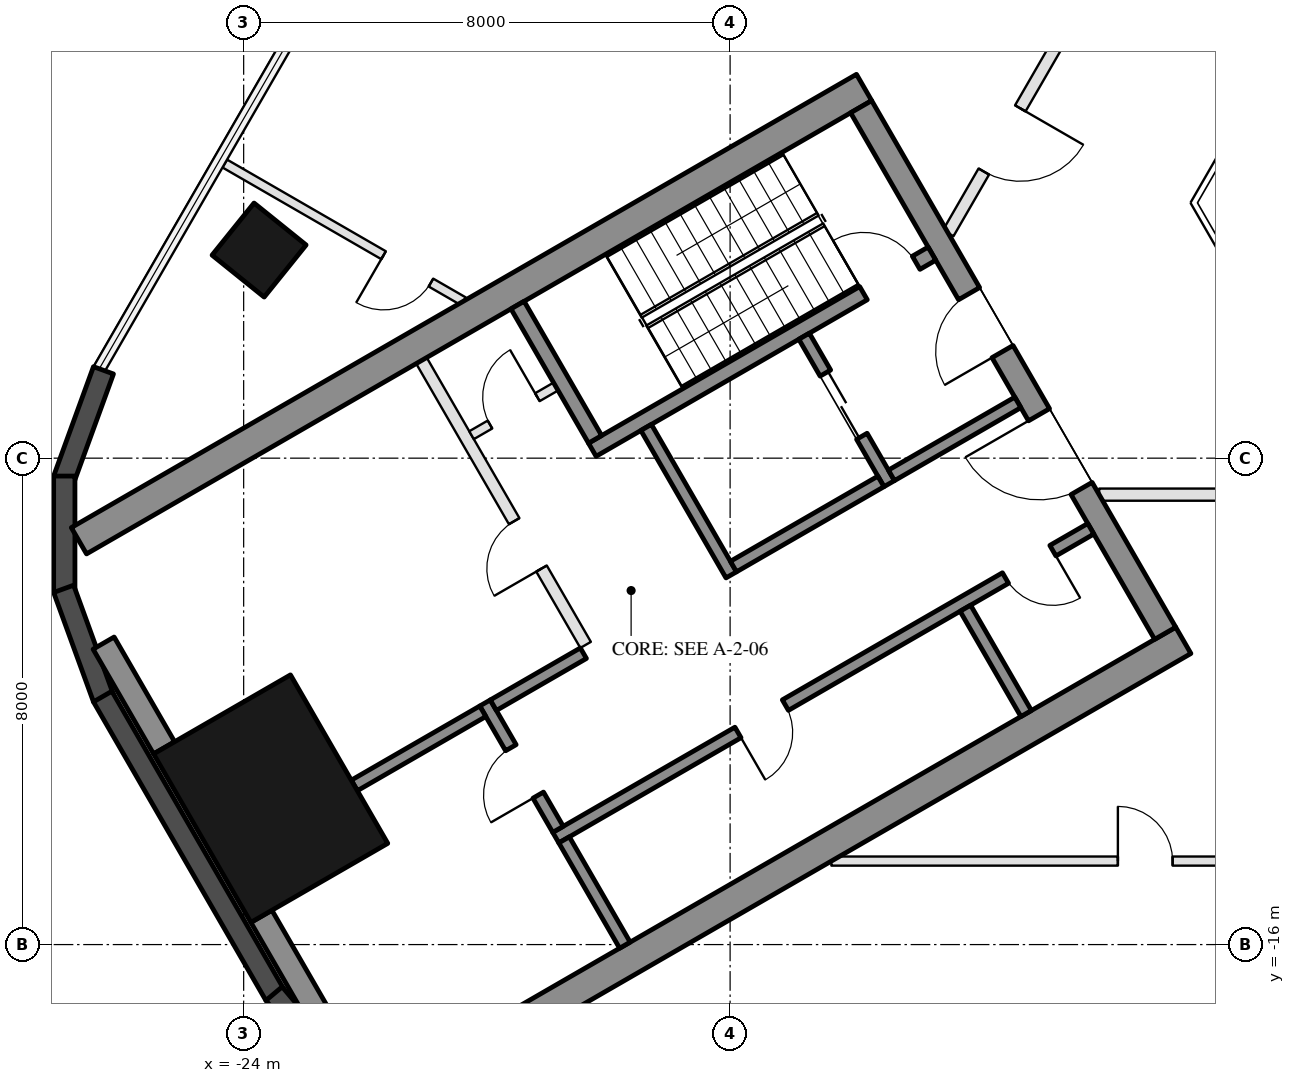
"""IFC4 building model, lengths in metres.
Left out: names, types, materials, properties, quantities, classifications, styles, units other than length and angle.
Written with IfcOpenShell. Run it as: python <this file> out.ifc"""

import sys

from ifc_helpers import new_model, si_unit, direction, frame, frame_2d, origin, origin_2d, place, context, subcontext, project, spatial, rectangle, hollow_rectangle, extrude, boolean, halfspace, element, fill, save


model = new_model("IFC4")
c1 = context("Model", 3, precision=1e-05, world=origin(), true_north=direction((0.0, 1.0)))
c2 = subcontext(c1, "Body", "Model", "MODEL_VIEW")
j1 = project(units=[si_unit("LENGTHUNIT", "METRE"), si_unit("PLANEANGLEUNIT", "RADIAN")], contexts=[c1])
p1 = place(None, origin())
s1 = spatial("IfcSite", under=j1, at=p1, CompositionType="ELEMENT")
p2 = place(p1, origin())
s2 = spatial("IfcBuilding", under=s1, at=p2, CompositionType="ELEMENT")
p3 = place(p2, frame((0.0, 0.0, 33.0)))
s3 = spatial("IfcBuildingStorey", under=s2, at=p3, CompositionType="ELEMENT", Elevation=33.0)
p4 = place(p3, frame((-23.746, -4.577, 0.0), z_axis=(0.01301970202, 0.00206145282, 0.999913115111), x_axis=(-0.497599356322, -0.867367587298, 0.008267351011)))
e1 = element("IfcColumn", 1, at=p4, inside=s3, PredefinedType="COLUMN", context=c2, shape_type="SweptSolid", body=[
    boolean("DIFFERENCE", boolean("DIFFERENCE", extrude(hollow_rectangle(XDim=1.1, YDim=1.1, WallThickness=0.05, at=origin_2d()), origin(), (0.0, 0.0, 1.0), 4.5), halfspace(frame((0.0, 0.0, 0.012), z_axis=(0.0, 0.0, 1.0), x_axis=(1.0, 0.0, 0.0)), True)), halfspace(frame((0.0, 0.0, 4.493), z_axis=(0.0, 0.0, 1.0), x_axis=(1.0, 0.0, 0.0)), False)),
])
p5 = place(p3, frame((-23.556, -13.6, 0.0), z_axis=(0.0, 0.0, 1.0), x_axis=(-0.5, 0.866025403784, 0.0)))
e2 = element("IfcColumn", 2, at=p5, inside=s3, PredefinedType="COLUMN", context=c2, shape_type="SweptSolid", body=[
    extrude(hollow_rectangle(XDim=3.2, YDim=2.6, WallThickness=0.08, at=origin_2d()), origin(), (0.0, 0.0, 1.0), 4.5),
])
for number, where, z_axis, x_axis in (
    (3, (-26.305, -6.555, 0.0), (0.0, 0.0, 1.0), (-0.342, -0.94, 0.0)),
    (4, (-26.95, -8.294, 0.0), (0.0, 0.0, 1.0), (0.0, -1.0, 0.0)),
    (5, (-26.96, -10.149, 0.0), (0.0, 0.0, 1.0), (0.342, -0.94, 0.0)),
):
    element("IfcWall", number, at=place(p3, frame(where, z_axis=z_axis, x_axis=x_axis)), inside=s3, PredefinedType="SOLIDWALL", context=c2, shape_type="SweptSolid", body=[
        extrude(rectangle(XDim=1.915, YDim=0.35, at=frame_2d((0.957, 0.0))), origin(), (0.0, 0.0, 1.0), 4.2),
    ])
p6 = place(p3, frame((-26.318, -11.921, 0.0), z_axis=(0.0, 0.0, 1.0), x_axis=(0.499982068559, -0.866035756259, 0.0)))
e6 = element("IfcWall", 6, at=p6, inside=s3, PredefinedType="SOLIDWALL", context=c2, shape_type="SweptSolid", body=[
    extrude(rectangle(XDim=5.671, YDim=0.35, at=frame_2d((2.835, 0.0))), origin(), (0.0, 0.0, 1.0), 4.2),
])
p7 = place(p3, frame((-23.5, -16.807, 0.0), z_axis=(0.0, 0.0, 1.0), x_axis=(0.64282715853, -0.766011255959, 0.0)))
e7 = element("IfcWall", 7, at=p7, inside=s3, PredefinedType="SOLIDWALL", context=c2, shape_type="SweptSolid", body=[
    extrude(rectangle(XDim=1.915, YDim=0.35, at=frame_2d((0.957, 0.0))), origin(), (0.0, 0.0, 1.0), 4.2),
])
for number, where, z_axis, x_axis in (
    (8, (-13.797, -1.903, 0.0), (0.0, 0.0, 1.0), (-0.866, -0.5, 0.0)),
    (9, (-8.547, -10.997, 0.0), (0.0, 0.0, 1.0), (-0.866, -0.5, 0.0)),
):
    element("IfcWall", number, at=place(p3, frame(where, z_axis=z_axis, x_axis=x_axis)), inside=s3, PredefinedType="SHEAR", context=c2, shape_type="SweptSolid", body=[
        extrude(rectangle(XDim=14.91, YDim=0.5, at=frame_2d((7.455, 0.0))), origin(), (0.0, 0.0, 1.0), 4.2),
    ])
p8 = place(p3, frame((-13.845, -2.22, 0.0), z_axis=(0.0, 0.0, 1.0), x_axis=(0.500004234368, -0.866022959057, 0.0)))
e10 = element("IfcWall", 10, at=p8, inside=s3, PredefinedType="SHEAR", context=c2, shape_type="SweptSolid", body=[
    extrude(rectangle(XDim=10.0, YDim=0.4, at=frame_2d((5.0, 0.0))), origin(), (0.0, 0.0, 1.0), 4.2),
])
p9 = place(p8, frame((3.55, 0.0, 0.0)))
e11 = element("IfcOpeningElement", 11, at=p9, cuts=e10, PredefinedType="OPENING", context=c2, shape_type="SweptSolid", body=[
    extrude(rectangle(XDim=1.1, YDim=2.1, at=frame_2d((0.55, 1.05))), frame((0.0, 0.21, 0.0), z_axis=(0.0, -1.0, 0.0), x_axis=(1.0, 0.0, 0.0)), (0.0, 0.0, 1.0), 0.42),
])
p10 = place(p8, frame((5.85, 0.0, 0.0)))
e12 = element("IfcOpeningElement", 12, at=p10, cuts=e10, PredefinedType="OPENING", context=c2, shape_type="SweptSolid", body=[
    extrude(rectangle(XDim=1.4, YDim=2.1, at=frame_2d((0.7, 1.05))), frame((0.0, 0.21, 0.0), z_axis=(0.0, -1.0, 0.0), x_axis=(1.0, 0.0, 0.0)), (0.0, 0.0, 1.0), 0.42),
])
for number, where, z_axis, x_axis in (
    (13, (-23.708, -15.536, 0.0), (0.0, 0.0, 1.0), (0.5, -0.866, 0.0)),
    (14, (-26.303, -11.042, 0.0), (0.0, 0.0, 1.0), (0.5, -0.866, 0.0)),
):
    element("IfcWall", number, at=place(p3, frame(where, z_axis=z_axis, x_axis=x_axis)), inside=s3, PredefinedType="SHEAR", context=c2, shape_type="SweptSolid", body=[
        extrude(rectangle(XDim=1.989, YDim=0.4, at=frame_2d((0.995, 0.0))), origin(), (0.0, 0.0, 1.0), 4.2),
    ])
p11 = place(p3, frame((-12.681, -4.636, 0.0), z_axis=(0.0, 0.0, 1.0), x_axis=(-0.866021702275, -0.500006411147, 0.0)))
e15 = element("IfcWall", 15, at=p11, inside=s3, PredefinedType="SHEAR", context=c2, shape_type="SweptSolid", body=[
    extrude(rectangle(XDim=6.45, YDim=0.25, at=frame_2d((3.225, 0.0))), origin(), (0.0, 0.0, 1.0), 4.2),
])
p12 = place(p11, frame((0.3, 0.0, 0.0)))
e16 = element("IfcOpeningElement", 16, at=p12, cuts=e15, PredefinedType="OPENING", context=c2, shape_type="SweptSolid", body=[
    extrude(rectangle(XDim=1.0, YDim=2.1, at=frame_2d((0.5, 1.05))), frame((0.0, 0.135, 0.0), z_axis=(0.0, -1.0, 0.0), x_axis=(1.0, 0.0, 0.0)), (0.0, 0.0, 1.0), 0.27),
])
p13 = place(p3, frame((-19.496, -5.482, 0.0), z_axis=(0.0, 0.0, 1.0), x_axis=(0.499990435942, -0.866030925526, 0.0)))
e17 = element("IfcWall", 17, at=p13, inside=s3, PredefinedType="SHEAR", context=c2, shape_type="SweptSolid", body=[
    extrude(rectangle(XDim=2.55, YDim=0.25, at=frame_2d((1.275, 0.0))), origin(), (0.0, 0.0, 1.0), 4.2),
])
p14 = place(p3, frame((-17.381, -7.495, 0.0), z_axis=(0.0, 0.0, 1.0), x_axis=(0.500011755427, -0.866018616679, 0.0)))
e18 = element("IfcWall", 18, at=p14, inside=s3, PredefinedType="SHEAR", context=c2, shape_type="SweptSolid", body=[
    extrude(rectangle(XDim=2.8, YDim=0.2, at=frame_2d((1.4, 0.0))), origin(), (0.0, 0.0, 1.0), 4.2),
])
p15 = place(p3, frame((-14.783, -5.995, 0.0), z_axis=(0.0, 0.0, 1.0), x_axis=(0.49994636267, -0.866056369097, 0.0)))
e19 = element("IfcWall", 19, at=p15, inside=s3, PredefinedType="SHEAR", context=c2, shape_type="SweptSolid", body=[
    extrude(rectangle(XDim=2.8, YDim=0.2, at=frame_2d((1.4, 0.0))), origin(), (0.0, 0.0, 1.0), 4.2),
])
p16 = place(p15, frame((0.7, 0.0, 0.0)))
e20 = element("IfcOpeningElement", 20, at=p16, cuts=e19, PredefinedType="OPENING", context=c2, shape_type="SweptSolid", body=[
    extrude(rectangle(XDim=1.2, YDim=2.1, at=frame_2d((0.6, 1.05))), frame((0.0, 0.11, 0.0), z_axis=(0.0, -1.0, 0.0), x_axis=(1.0, 0.0, 0.0)), (0.0, 0.0, 1.0), 0.22),
])
p17 = place(p3, frame((-13.52, -8.383, 0.0), z_axis=(0.0, 0.0, 1.0), x_axis=(-0.866034573852, -0.49998411664, 0.0)))
e21 = element("IfcWall", 21, at=p17, inside=s3, PredefinedType="SHEAR", context=c2, shape_type="SweptSolid", body=[
    extrude(rectangle(XDim=2.8, YDim=0.2, at=frame_2d((1.4, 0.0))), origin(), (0.0, 0.0, 1.0), 4.2),
])
p18 = place(p3, frame((-11.268, -7.083, 0.0), z_axis=(0.0, 0.0, 1.0), x_axis=(-0.866050077142, -0.499957262057, 0.0)))
e22 = element("IfcWall", 22, at=p18, inside=s3, PredefinedType="SHEAR", context=c2, shape_type="SweptSolid", body=[
    extrude(rectangle(XDim=2.4, YDim=0.2, at=frame_2d((1.2, 0.0))), origin(), (0.0, 0.0, 1.0), 4.2),
])
p19 = place(p3, frame((-10.068, -9.162, 0.0), z_axis=(0.0, 0.0, 1.0), x_axis=(-0.866032725843, -0.499987317609, 0.0)))
e23 = element("IfcWall", 23, at=p19, inside=s3, PredefinedType="SHEAR", context=c2, shape_type="SweptSolid", body=[
    extrude(rectangle(XDim=10.16, YDim=0.2, at=frame_2d((5.08, 0.0))), origin(), (0.0, 0.0, 1.0), 4.2),
])
p20 = place(p19, frame((0.72, 0.0, 0.0)))
e24 = element("IfcOpeningElement", 24, at=p20, cuts=e23, PredefinedType="OPENING", context=c2, shape_type="SweptSolid", body=[
    extrude(rectangle(XDim=0.9, YDim=2.1, at=frame_2d((0.45, 1.05))), frame((0.0, 0.11, 0.0), z_axis=(0.0, -1.0, 0.0), x_axis=(1.0, 0.0, 0.0)), (0.0, 0.0, 1.0), 0.22),
])
p21 = place(p19, frame((5.8, 0.0, 0.0)))
e25 = element("IfcOpeningElement", 25, at=p21, cuts=e23, PredefinedType="OPENING", context=c2, shape_type="SweptSolid", body=[
    extrude(rectangle(XDim=0.9, YDim=2.1, at=frame_2d((0.45, 1.05))), frame((0.0, 0.11, 0.0), z_axis=(0.0, -1.0, 0.0), x_axis=(1.0, 0.0, 0.0)), (0.0, 0.0, 1.0), 0.22),
])
p22 = place(p3, frame((-20.031, -12.026, 0.0), z_axis=(0.0, 0.0, 1.0), x_axis=(0.500033551112, -0.866006032174, 0.0)))
e26 = element("IfcWall", 26, at=p22, inside=s3, PredefinedType="SHEAR", context=c2, shape_type="SweptSolid", body=[
    extrude(rectangle(XDim=2.4, YDim=0.2, at=frame_2d((1.2, 0.0))), origin(), (0.0, 0.0, 1.0), 4.2),
])
p23 = place(p22, frame((0.85, 0.0, 0.0)))
e27 = element("IfcOpeningElement", 27, at=p23, cuts=e26, PredefinedType="OPENING", context=c2, shape_type="SweptSolid", body=[
    extrude(rectangle(XDim=0.9, YDim=2.1, at=frame_2d((0.45, 1.05))), frame((0.0, 0.11, 0.0), z_axis=(0.0, -1.0, 0.0), x_axis=(1.0, 0.0, 0.0)), (0.0, 0.0, 1.0), 0.22),
])
p24 = place(p3, frame((-18.413, -11.208, 0.0), z_axis=(0.0, 0.0, 1.0), x_axis=(-0.866038183914, -0.499977863513, 0.0)))
e28 = element("IfcWall", 28, at=p24, inside=s3, PredefinedType="SHEAR", context=c2, shape_type="SweptSolid", body=[
    extrude(rectangle(XDim=1.71, YDim=0.2, at=frame_2d((0.855, 0.0))), origin(), (0.0, 0.0, 1.0), 4.2),
])
for number, where, z_axis, x_axis in (
    (29, (-12.131, -10.468, 0.0), (0.0, 0.0, 1.0), (0.5, -0.866, 0.0)),
    (30, (-18.73, -14.278, 0.0), (0.0, 0.0, 1.0), (0.5, -0.866, 0.0)),
):
    element("IfcWall", number, at=place(p3, frame(where, z_axis=z_axis, x_axis=x_axis)), inside=s3, PredefinedType="SHEAR", context=c2, shape_type="SweptSolid", body=[
        extrude(rectangle(XDim=2.0, YDim=0.2, at=frame_2d((1.0, 0.0))), origin(), (0.0, 0.0, 1.0), 4.2),
    ])
p25 = place(p3, frame((-20.067, -12.163, 0.0), z_axis=(0.0, 0.0, 1.0), x_axis=(-0.866048967903, -0.499959183527, 0.0)))
e31 = element("IfcWall", 31, at=p25, inside=s3, PredefinedType="SHEAR", context=c2, shape_type="SweptSolid", body=[
    extrude(rectangle(XDim=2.44, YDim=0.2, at=frame_2d((1.22, 0.0))), origin(), (0.0, 0.0, 1.0), 4.2),
])
p26 = place(p3, frame((-21.076, -6.395, 0.0), z_axis=(0.0, 0.0, 1.0), x_axis=(0.50001468107, -0.866016927499, 0.0)))
e32 = element("IfcWall", 32, at=p26, inside=s3, PredefinedType="PARTITIONING", context=c2, shape_type="SweptSolid", body=[
    extrude(rectangle(XDim=5.4, YDim=0.2, at=frame_2d((2.7, 0.0))), origin(), (0.0, 0.0, 1.0), 4.2),
])
p27 = place(p26, frame((3.05, 0.0, 0.0)))
e33 = element("IfcOpeningElement", 33, at=p27, cuts=e32, PredefinedType="OPENING", context=c2, shape_type="SweptSolid", body=[
    extrude(rectangle(XDim=0.9, YDim=2.1, at=frame_2d((0.45, 1.05))), frame((0.0, 0.11, 0.0), z_axis=(0.0, -1.0, 0.0), x_axis=(1.0, 0.0, 0.0)), (0.0, 0.0, 1.0), 0.22),
])
p28 = place(p3, frame((-18.866, -6.822, 0.0), z_axis=(0.0, 0.0, 1.0), x_axis=(-0.866028054938, -0.499995408039, 0.0)))
e34 = element("IfcWall", 34, at=p28, inside=s3, PredefinedType="PARTITIONING", context=c2, shape_type="SweptSolid", body=[
    extrude(rectangle(XDim=1.6, YDim=0.15, at=frame_2d((0.8, 0.0))), origin(), (0.0, 0.0, 1.0), 4.2),
])
p29 = place(p28, frame((0.35, 0.0, 0.0)))
e35 = element("IfcOpeningElement", 35, at=p29, cuts=e34, PredefinedType="OPENING", context=c2, shape_type="SweptSolid", body=[
    extrude(rectangle(XDim=0.9, YDim=2.1, at=frame_2d((0.45, 1.05))), frame((0.0, 0.085, 0.0), z_axis=(0.0, -1.0, 0.0), x_axis=(1.0, 0.0, 0.0)), (0.0, 0.0, 1.0), 0.17),
])
p30 = place(p3, frame((-14.335, -14.627, 0.0), z_axis=(0.0, 0.0, 1.0), x_axis=(1.0, 0.0, 0.0)))
e36 = element("IfcWall", 36, at=p30, inside=s3, PredefinedType="PARTITIONING", context=c2, shape_type="SweptSolid", body=[
    extrude(rectangle(XDim=10.26, YDim=0.15, at=frame_2d((5.13, 0.0))), origin(), (0.0, 0.0, 1.0), 3.41),
])
p31 = place(p30, frame((4.712, 0.0, 0.0)))
e37 = element("IfcOpeningElement", 37, at=p31, cuts=e36, PredefinedType="OPENING", context=c2, shape_type="SweptSolid", body=[
    extrude(rectangle(XDim=0.9, YDim=2.1, at=frame_2d((0.45, 1.05))), frame((0.0, 0.085, 0.0), z_axis=(0.0, -1.0, 0.0), x_axis=(1.0, 0.0, 0.0)), (0.0, 0.0, 1.0), 0.17),
])
p32 = place(p3, frame((-9.93, -8.6, 0.0), z_axis=(0.0, 0.0, 1.0), x_axis=(1.0, 0.0, 0.0)))
e38 = element("IfcWall", 38, at=p32, inside=s3, PredefinedType="PARTITIONING", context=c2, shape_type="SweptSolid", body=[
    extrude(rectangle(XDim=19.861, YDim=0.2, at=frame_2d((9.93, 0.0))), origin(), (0.0, 0.0, 1.0), 3.41),
])
p33 = place(p32, frame((2.234, 0.0, 0.0)))
e39 = element("IfcOpeningElement", 39, at=p33, cuts=e38, PredefinedType="OPENING", context=c2, shape_type="SweptSolid", body=[
    extrude(rectangle(XDim=1.5, YDim=2.1, at=frame_2d((0.75, 1.05))), frame((0.0, 0.11, 0.0), z_axis=(0.0, -1.0, 0.0), x_axis=(1.0, 0.0, 0.0)), (0.0, 0.0, 1.0), 0.22),
])
p34 = place(p32, frame((12.278, 0.0, 0.0)))
e40 = element("IfcOpeningElement", 40, at=p34, cuts=e38, PredefinedType="OPENING", context=c2, shape_type="SweptSolid", body=[
    extrude(rectangle(XDim=1.2, YDim=2.1, at=frame_2d((0.6, 1.05))), frame((0.0, 0.11, 0.0), z_axis=(0.0, -1.0, 0.0), x_axis=(1.0, 0.0, 0.0)), (0.0, 0.0, 1.0), 0.22),
])
p35 = place(p3, frame((-24.31, -3.155, 0.0), z_axis=(0.0, 0.0, 1.0), x_axis=(0.866025843094, -0.499999239093, 0.0)))
e41 = element("IfcWall", 41, at=p35, inside=s3, PredefinedType="PARTITIONING", context=c2, shape_type="SweptSolid", body=[
    extrude(rectangle(XDim=4.53, YDim=0.15, at=frame_2d((2.265, 0.0))), origin(), (0.0, 0.0, 1.0), 4.2),
])
p36 = place(p35, frame((3.015, 0.0, 0.0)))
e42 = element("IfcOpeningElement", 42, at=p36, cuts=e41, PredefinedType="OPENING", context=c2, shape_type="SweptSolid", body=[
    extrude(rectangle(XDim=0.9, YDim=2.1, at=frame_2d((0.45, 1.05))), frame((0.0, 0.085, 0.0), z_axis=(0.0, -1.0, 0.0), x_axis=(1.0, 0.0, 0.0)), (0.0, 0.0, 1.0), 0.17),
])
p37 = place(p3, frame((-2.482, 12.9, 0.0), z_axis=(0.0, 0.0, 1.0), x_axis=(-0.50000478328, -0.866022642139, 0.0)))
e43 = element("IfcWall", 43, at=p37, inside=s3, PredefinedType="PARTITIONING", context=c2, shape_type="SweptSolid", body=[
    extrude(rectangle(XDim=19.861, YDim=0.2, at=frame_2d((9.931, 0.0))), origin(), (0.0, 0.0, 1.0), 3.41),
])
p38 = place(p37, frame((13.23, 0.0, 0.0)))
e44 = element("IfcOpeningElement", 44, at=p38, cuts=e43, PredefinedType="OPENING", context=c2, shape_type="SweptSolid", body=[
    extrude(rectangle(XDim=1.8, YDim=2.1, at=frame_2d((0.9, 1.05))), frame((0.0, 0.11, 0.0), z_axis=(0.0, -1.0, 0.0), x_axis=(1.0, 0.0, 0.0)), (0.0, 0.0, 1.0), 0.22),
])
p39 = place(p37, frame((0.667, 0.0, 0.0)))
e45 = element("IfcOpeningElement", 45, at=p39, cuts=e43, PredefinedType="OPENING", context=c2, shape_type="SweptSolid", body=[
    extrude(rectangle(XDim=1.0, YDim=2.1, at=frame_2d((0.5, 1.05))), frame((0.0, 0.11, 0.0), z_axis=(0.0, -1.0, 0.0), x_axis=(1.0, 0.0, 0.0)), (0.0, 0.0, 1.0), 0.22),
])
p40 = place(p37, frame((2.1, 0.0, 0.0)))
e46 = element("IfcOpeningElement", 46, at=p40, cuts=e43, PredefinedType="OPENING", context=c2, shape_type="SweptSolid", body=[
    extrude(rectangle(XDim=1.0, YDim=2.1, at=frame_2d((0.5, 1.05))), frame((0.0, 0.11, 0.0), z_axis=(0.0, -1.0, 0.0), x_axis=(1.0, 0.0, 0.0)), (0.0, 0.0, 1.0), 0.22),
])
p41 = place(p37, frame((17.49, 0.0, 0.0)))
e47 = element("IfcOpeningElement", 47, at=p41, cuts=e43, PredefinedType="OPENING", context=c2, shape_type="SweptSolid", body=[
    extrude(rectangle(XDim=1.2, YDim=2.1, at=frame_2d((0.6, 1.05))), frame((0.0, 0.11, 0.0), z_axis=(0.0, -1.0, 0.0), x_axis=(1.0, 0.0, 0.0)), (0.0, 0.0, 1.0), 0.22),
])
p42 = place(p37, frame((7.168, 0.0, 0.0)))
e48 = element("IfcOpeningElement", 48, at=p42, cuts=e43, PredefinedType="OPENING", context=c2, shape_type="SweptSolid", body=[
    extrude(rectangle(XDim=1.0, YDim=2.1, at=frame_2d((0.5, 1.05))), frame((0.0, 0.11, 0.0), z_axis=(0.0, -1.0, 0.0), x_axis=(1.0, 0.0, 0.0)), (0.0, 0.0, 1.0), 0.22),
])
p43 = place(p16, origin())
e49 = element("IfcDoor", 49, at=p43, inside=s3, OperationType="DOUBLE_DOOR_SLIDING", PredefinedType="DOOR", context=c2, shape_type="SweptSolid", body=[
    extrude(rectangle(XDim=1.2, YDim=2.1, at=frame_2d((0.6, 1.05))), frame((0.0, 0.025, 0.0), z_axis=(0.0, -1.0, 0.0), x_axis=(1.0, 0.0, 0.0)), (0.0, 0.0, 1.0), 0.05),
])
fill(e20, e49)
p44 = place(p29, frame((0.9, 0.0, 0.0), z_axis=(0.0, 0.0, 1.0), x_axis=(-1.0, 0.0, 0.0)))
e50 = element("IfcDoor", 50, at=p44, inside=s3, OperationType="SINGLE_SWING_RIGHT", PredefinedType="DOOR", context=c2, shape_type="SweptSolid", body=[
    extrude(rectangle(XDim=0.9, YDim=2.1, at=frame_2d((0.45, 1.05))), frame((0.0, 0.025, 0.0), z_axis=(0.0, -1.0, 0.0), x_axis=(1.0, 0.0, 0.0)), (0.0, 0.0, 1.0), 0.05),
])
fill(e35, e50)
p45 = place(p20, origin())
e51 = element("IfcDoor", 51, at=p45, inside=s3, OperationType="SINGLE_SWING_LEFT", PredefinedType="DOOR", context=c2, shape_type="SweptSolid", body=[
    extrude(rectangle(XDim=0.9, YDim=2.1, at=frame_2d((0.45, 1.05))), frame((0.0, 0.025, 0.0), z_axis=(0.0, -1.0, 0.0), x_axis=(1.0, 0.0, 0.0)), (0.0, 0.0, 1.0), 0.05),
])
fill(e24, e51)
p46 = place(p21, origin())
e52 = element("IfcDoor", 52, at=p46, inside=s3, OperationType="SINGLE_SWING_RIGHT", PredefinedType="DOOR", context=c2, shape_type="SweptSolid", body=[
    extrude(rectangle(XDim=0.9, YDim=2.1, at=frame_2d((0.45, 1.05))), frame((0.0, 0.025, 0.0), z_axis=(0.0, -1.0, 0.0), x_axis=(1.0, 0.0, 0.0)), (0.0, 0.0, 1.0), 0.05),
])
fill(e25, e52)
p47 = place(p23, frame((0.9, 0.0, 0.0), z_axis=(0.0, 0.0, 1.0), x_axis=(-1.0, 0.0, 0.0)))
e53 = element("IfcDoor", 53, at=p47, inside=s3, OperationType="SINGLE_SWING_LEFT", PredefinedType="DOOR", context=c2, shape_type="SweptSolid", body=[
    extrude(rectangle(XDim=0.9, YDim=2.1, at=frame_2d((0.45, 1.05))), frame((0.0, 0.025, 0.0), z_axis=(0.0, -1.0, 0.0), x_axis=(1.0, 0.0, 0.0)), (0.0, 0.0, 1.0), 0.05),
])
fill(e27, e53)
p48 = place(p27, frame((0.9, 0.0, 0.0), z_axis=(0.0, 0.0, 1.0), x_axis=(-1.0, 0.0, 0.0)))
e54 = element("IfcDoor", 54, at=p48, inside=s3, OperationType="SINGLE_SWING_LEFT", PredefinedType="DOOR", context=c2, shape_type="SweptSolid", body=[
    extrude(rectangle(XDim=0.9, YDim=2.1, at=frame_2d((0.45, 1.05))), frame((0.0, 0.025, 0.0), z_axis=(0.0, -1.0, 0.0), x_axis=(1.0, 0.0, 0.0)), (0.0, 0.0, 1.0), 0.05),
])
fill(e33, e54)
p49 = place(p9, frame((1.1, 0.0, 0.0), z_axis=(0.0, 0.0, 1.0), x_axis=(-1.0, 0.0, 0.0)))
e55 = element("IfcDoor", 55, at=p49, inside=s3, OperationType="SINGLE_SWING_LEFT", PredefinedType="DOOR", context=c2, shape_type="SweptSolid", body=[
    extrude(rectangle(XDim=1.1, YDim=2.1, at=frame_2d((0.55, 1.05))), frame((0.0, 0.025, 0.0), z_axis=(0.0, -1.0, 0.0), x_axis=(1.0, 0.0, 0.0)), (0.0, 0.0, 1.0), 0.05),
])
fill(e11, e55)
p50 = place(p10, frame((1.4, 0.0, 0.0), z_axis=(0.0, 0.0, 1.0), x_axis=(-1.0, 0.0, 0.0)))
e56 = element("IfcDoor", 56, at=p50, inside=s3, OperationType="DOUBLE_DOOR_SINGLE_SWING", PredefinedType="DOOR", context=c2, shape_type="SweptSolid", body=[
    extrude(rectangle(XDim=1.4, YDim=2.1, at=frame_2d((0.7, 1.05))), frame((0.0, 0.025, 0.0), z_axis=(0.0, -1.0, 0.0), x_axis=(1.0, 0.0, 0.0)), (0.0, 0.0, 1.0), 0.05),
])
fill(e12, e56)
p51 = place(p12, frame((1.0, 0.0, 0.0), z_axis=(0.0, 0.0, 1.0), x_axis=(-1.0, 0.0, 0.0)))
e57 = element("IfcDoor", 57, at=p51, inside=s3, OperationType="SINGLE_SWING_LEFT", PredefinedType="DOOR", context=c2, shape_type="SweptSolid", body=[
    extrude(rectangle(XDim=1.0, YDim=2.1, at=frame_2d((0.5, 1.05))), frame((0.0, 0.025, 0.0), z_axis=(0.0, -1.0, 0.0), x_axis=(1.0, 0.0, 0.0)), (0.0, 0.0, 1.0), 0.05),
])
fill(e16, e57)
p52 = place(p31, origin())
e58 = element("IfcDoor", 58, at=p52, inside=s3, OperationType="SINGLE_SWING_LEFT", PredefinedType="DOOR", context=c2, shape_type="SweptSolid", body=[
    extrude(rectangle(XDim=0.9, YDim=2.1, at=frame_2d((0.45, 1.05))), frame((0.0, 0.025, 0.0), z_axis=(0.0, -1.0, 0.0), x_axis=(1.0, 0.0, 0.0)), (0.0, 0.0, 1.0), 0.05),
])
fill(e37, e58)
p53 = place(p41, origin())
e59 = element("IfcDoor", 59, at=p53, inside=s3, OperationType="SINGLE_SWING_LEFT", PredefinedType="DOOR", context=c2, shape_type="SweptSolid", body=[
    extrude(rectangle(XDim=1.2, YDim=2.1, at=frame_2d((0.6, 1.05))), frame((0.0, 0.025, 0.0), z_axis=(0.0, -1.0, 0.0), x_axis=(1.0, 0.0, 0.0)), (0.0, 0.0, 1.0), 0.05),
])
fill(e47, e59)
p54 = place(p36, frame((0.9, 0.0, 0.0), z_axis=(0.0, 0.0, 1.0), x_axis=(-1.0, 0.0, 0.0)))
e60 = element("IfcDoor", 60, at=p54, inside=s3, OperationType="SINGLE_SWING_RIGHT", PredefinedType="DOOR", context=c2, shape_type="SweptSolid", body=[
    extrude(rectangle(XDim=0.9, YDim=2.1, at=frame_2d((0.45, 1.05))), frame((0.0, 0.025, 0.0), z_axis=(0.0, -1.0, 0.0), x_axis=(1.0, 0.0, 0.0)), (0.0, 0.0, 1.0), 0.05),
])
fill(e42, e60)
save(model, sys.argv[1])
